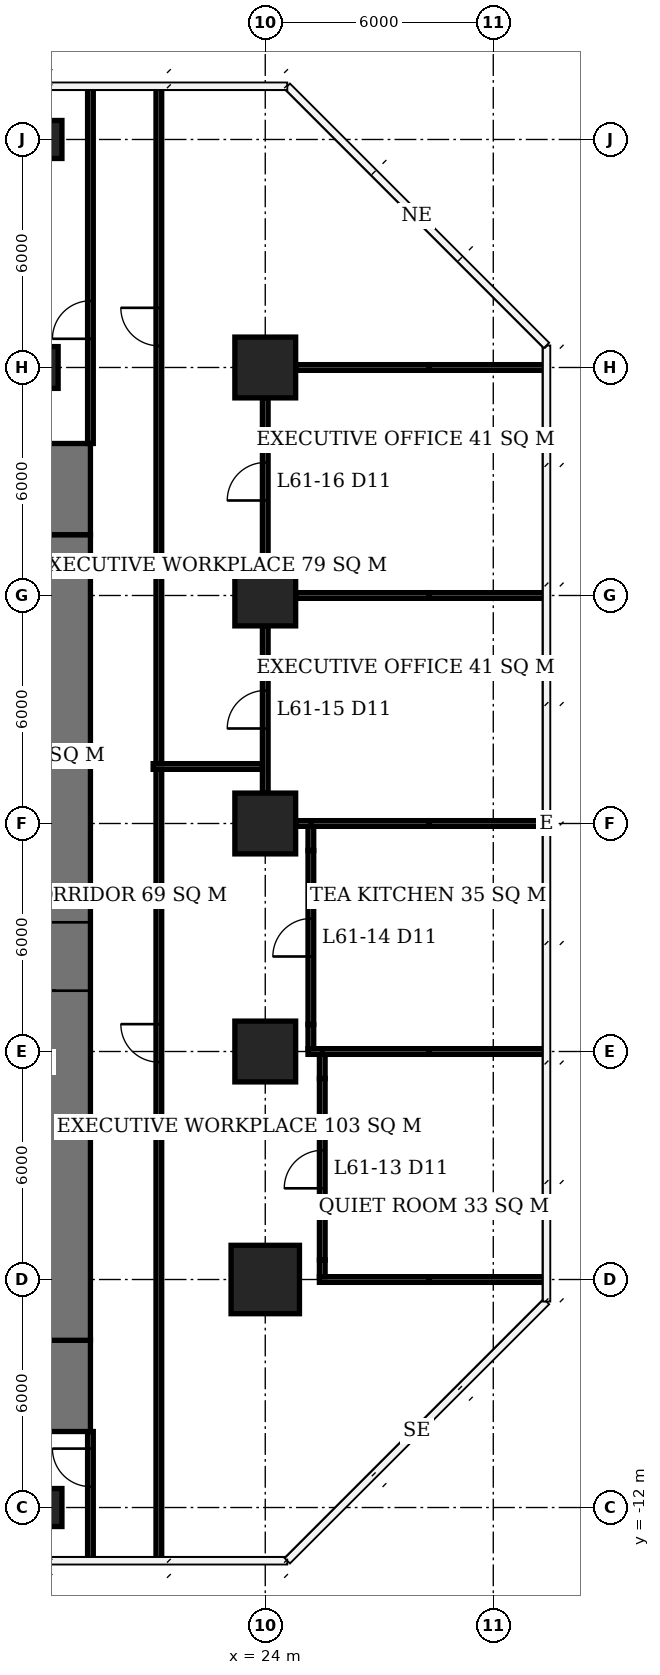
"""IFC4 building model, lengths in metres.
Left out: names, types, materials, properties, quantities, classifications, styles, units other than length and angle.
Written with IfcOpenShell. Run it as: python <this file> out.ifc"""

import sys

from ifc_helpers import new_model, si_unit, direction, frame, frame_2d, origin, origin_2d, place, context, subcontext, project, spatial, rectangle, extrude, element, fill, save


model = new_model("IFC4")
c1 = context("Model", 3, precision=1e-05, world=origin(), true_north=direction((0.0, 1.0)))
c2 = subcontext(c1, "Body", "Model", "MODEL_VIEW")
j1 = project(units=[si_unit("LENGTHUNIT", "METRE"), si_unit("PLANEANGLEUNIT", "RADIAN")], contexts=[c1])
p1 = place(None, origin())
s1 = spatial("IfcSite", under=j1, at=p1, CompositionType="ELEMENT")
p2 = place(p1, origin())
s2 = spatial("IfcBuilding", under=s1, at=p2, CompositionType="ELEMENT")
p3 = place(p2, frame((0.0, 0.0, 248.9)))
s3 = spatial("IfcBuildingStorey", under=s2, at=p3, CompositionType="ELEMENT", Elevation=248.9)
p4 = place(p3, frame((18.0, -12.0, 0.0), z_axis=(0.0, 0.0, 1.0), x_axis=(1.0, 0.0, 0.0)))
e1 = element("IfcColumn", 1, at=p4, inside=s3, PredefinedType="COLUMN", context=c2, shape_type="SweptSolid", body=[
    extrude(rectangle(XDim=1.3, YDim=1.0, at=origin_2d()), origin(), (0.0, 0.0, 1.0), 3.9),
])
p5 = place(p3, frame((18.0, 18.0, 0.0), z_axis=(0.0, 0.0, 1.0), x_axis=(1.0, 0.0, 0.0)))
e2 = element("IfcColumn", 2, at=p5, inside=s3, PredefinedType="COLUMN", context=c2, shape_type="SweptSolid", body=[
    extrude(rectangle(XDim=1.1, YDim=1.1, at=origin_2d()), origin(), (0.0, 0.0, 1.0), 3.9),
])
p6 = place(p3, frame((18.0, 24.0, 0.0), z_axis=(0.0, 0.0, 1.0), x_axis=(1.0, 0.0, 0.0)))
e3 = element("IfcColumn", 3, at=p6, inside=s3, PredefinedType="COLUMN", context=c2, shape_type="SweptSolid", body=[
    extrude(rectangle(XDim=1.3, YDim=1.0, at=origin_2d()), origin(), (0.0, 0.0, 1.0), 3.9),
])
p7 = place(p3, frame((24.0, -6.0, 0.0), z_axis=(0.0, 0.0, 1.0), x_axis=(1.0, 0.0, 0.0)))
e4 = element("IfcColumn", 4, at=p7, inside=s3, PredefinedType="COLUMN", context=c2, shape_type="SweptSolid", body=[
    extrude(rectangle(XDim=1.8, YDim=1.8, at=origin_2d()), origin(), (0.0, 0.0, 1.0), 3.9),
])
for number, where, z_axis, x_axis in (
    (5, (24.0, 0.0, 0.0), (0.0, 0.0, 1.0), (1.0, 0.0, 0.0)),
    (6, (24.0, 6.0, 0.0), (0.0, 0.0, 1.0), (1.0, 0.0, 0.0)),
    (7, (24.0, 12.0, 0.0), (0.0, 0.0, 1.0), (1.0, 0.0, 0.0)),
    (8, (24.0, 18.0, 0.0), (0.0, 0.0, 1.0), (1.0, 0.0, 0.0)),
):
    element("IfcColumn", number, at=place(p3, frame(where, z_axis=z_axis, x_axis=x_axis)), inside=s3, PredefinedType="COLUMN", context=c2, shape_type="SweptSolid", body=[
        extrude(rectangle(XDim=1.6, YDim=1.6, at=origin_2d()), origin(), (0.0, 0.0, 1.0), 3.9),
    ])
p8 = place(p3, frame((18.5, -7.6, 0.0), z_axis=(0.0, 0.0, 1.0), x_axis=(0.0, 1.0, 0.0)))
e9 = element("IfcWall", 9, at=p8, inside=s3, PredefinedType="SHEAR", context=c2, shape_type="SweptSolid", body=[
    extrude(rectangle(XDim=21.2, YDim=1.8, at=frame_2d((10.6, 0.0))), origin(), (0.0, 0.0, 1.0), 3.9),
])
p9 = place(p8, frame((9.2, 0.0, 0.0)))
e10 = element("IfcOpeningElement", 10, at=p9, cuts=e9, PredefinedType="OPENING", context=c2, shape_type="SweptSolid", body=[
    extrude(rectangle(XDim=1.8, YDim=2.4, at=frame_2d((0.9, 1.2))), frame((0.0, 0.91, 0.0), z_axis=(0.0, -1.0, 0.0), x_axis=(1.0, 0.0, 0.0)), (0.0, 0.0, 1.0), 1.82),
])
for number, where, z_axis, x_axis in (
    (11, (18.5, -10.0, 0.0), (0.0, 0.0, 1.0), (0.0, 1.0, 0.0)),
    (12, (18.5, 13.6, 0.0), (0.0, 0.0, 1.0), (0.0, 1.0, 0.0)),
):
    element("IfcWall", number, at=place(p3, frame(where, z_axis=z_axis, x_axis=x_axis)), inside=s3, PredefinedType="SHEAR", context=c2, shape_type="SweptSolid", body=[
        extrude(rectangle(XDim=2.4, YDim=1.8, at=frame_2d((1.2, 0.0))), origin(), (0.0, 0.0, 1.0), 3.9),
    ])
p10 = place(p3, frame((25.425, -6.0, 0.0), z_axis=(0.0, 0.0, 1.0), x_axis=(1.0, 0.0, 0.0)))
e13 = element("IfcWall", 13, at=p10, inside=s3, PredefinedType="PARTITIONING", context=c2, shape_type="SweptSolid", body=[
    extrude(rectangle(XDim=2.885, YDim=0.15, at=frame_2d((1.442, 0.0))), origin(), (0.0, 0.0, 1.0), 2.65),
])
p11 = place(p3, frame((28.31, -6.0, 0.0), z_axis=(0.0, 0.0, 1.0), x_axis=(1.0, 0.0, 0.0)))
e14 = element("IfcWall", 14, at=p11, inside=s3, PredefinedType="PARTITIONING", context=c2, shape_type="SweptSolid", body=[
    extrude(rectangle(XDim=3.065, YDim=0.15, at=frame_2d((1.532, 0.0))), origin(), (0.0, 0.0, 1.0), 3.65),
])
p12 = place(p3, frame((25.125, 0.0, 0.0), z_axis=(0.0, 0.0, 1.0), x_axis=(1.0, 0.0, 0.0)))
e15 = element("IfcWall", 15, at=p12, inside=s3, PredefinedType="PARTITIONING", context=c2, shape_type="SweptSolid", body=[
    extrude(rectangle(XDim=0.45, YDim=0.15, at=frame_2d((0.225, 0.0))), origin(), (0.0, 0.0, 1.0), 2.65),
])
p13 = place(p3, frame((25.5, 0.0, 0.0), z_axis=(0.0, 0.0, 1.0), x_axis=(1.0, 0.0, 0.0)))
e16 = element("IfcWall", 16, at=p13, inside=s3, PredefinedType="PARTITIONING", context=c2, shape_type="SweptSolid", body=[
    extrude(rectangle(XDim=2.81, YDim=0.15, at=frame_2d((1.405, 0.0))), origin(), (0.0, 0.0, 1.0), 2.65),
])
p14 = place(p3, frame((28.31, 0.0, 0.0), z_axis=(0.0, 0.0, 1.0), x_axis=(1.0, 0.0, 0.0)))
e17 = element("IfcWall", 17, at=p14, inside=s3, PredefinedType="PARTITIONING", context=c2, shape_type="SweptSolid", body=[
    extrude(rectangle(XDim=3.065, YDim=0.15, at=frame_2d((1.532, 0.0))), origin(), (0.0, 0.0, 1.0), 3.65),
])
p15 = place(p3, frame((24.8, 6.0, 0.0), z_axis=(0.0, 0.0, 1.0), x_axis=(1.0, 0.0, 0.0)))
e18 = element("IfcWall", 18, at=p15, inside=s3, PredefinedType="PARTITIONING", context=c2, shape_type="SweptSolid", body=[
    extrude(rectangle(XDim=0.475, YDim=0.15, at=frame_2d((0.237, 0.0))), origin(), (0.0, 0.0, 1.0), 2.65),
])
p16 = place(p3, frame((25.2, 6.0, 0.0), z_axis=(0.0, 0.0, 1.0), x_axis=(1.0, 0.0, 0.0)))
e19 = element("IfcWall", 19, at=p16, inside=s3, PredefinedType="PARTITIONING", context=c2, shape_type="SweptSolid", body=[
    extrude(rectangle(XDim=3.11, YDim=0.15, at=frame_2d((1.555, 0.0))), origin(), (0.0, 0.0, 1.0), 2.65),
])
p17 = place(p3, frame((28.31, 6.0, 0.0), z_axis=(0.0, 0.0, 1.0), x_axis=(1.0, 0.0, 0.0)))
e20 = element("IfcWall", 20, at=p17, inside=s3, PredefinedType="PARTITIONING", context=c2, shape_type="SweptSolid", body=[
    extrude(rectangle(XDim=3.04, YDim=0.15, at=frame_2d((1.52, 0.0))), origin(), (0.0, 0.0, 1.0), 3.65),
])
p18 = place(p3, frame((24.8, 12.0, 0.0), z_axis=(0.0, 0.0, 1.0), x_axis=(1.0, 0.0, 0.0)))
e21 = element("IfcWall", 21, at=p18, inside=s3, PredefinedType="PARTITIONING", context=c2, shape_type="SweptSolid", body=[
    extrude(rectangle(XDim=3.51, YDim=0.15, at=frame_2d((1.755, 0.0))), origin(), (0.0, 0.0, 1.0), 2.65),
])
p19 = place(p3, frame((28.31, 12.0, 0.0), z_axis=(0.0, 0.0, 1.0), x_axis=(1.0, 0.0, 0.0)))
e22 = element("IfcWall", 22, at=p19, inside=s3, PredefinedType="PARTITIONING", context=c2, shape_type="SweptSolid", body=[
    extrude(rectangle(XDim=3.065, YDim=0.15, at=frame_2d((1.532, 0.0))), origin(), (0.0, 0.0, 1.0), 3.65),
])
p20 = place(p3, frame((24.8, 18.0, 0.0), z_axis=(0.0, 0.0, 1.0), x_axis=(1.0, 0.0, 0.0)))
e23 = element("IfcWall", 23, at=p20, inside=s3, PredefinedType="PARTITIONING", context=c2, shape_type="SweptSolid", body=[
    extrude(rectangle(XDim=3.51, YDim=0.15, at=frame_2d((1.755, 0.0))), origin(), (0.0, 0.0, 1.0), 2.65),
])
p21 = place(p3, frame((28.31, 18.0, 0.0), z_axis=(0.0, 0.0, 1.0), x_axis=(1.0, 0.0, 0.0)))
e24 = element("IfcWall", 24, at=p21, inside=s3, PredefinedType="PARTITIONING", context=c2, shape_type="SweptSolid", body=[
    extrude(rectangle(XDim=3.065, YDim=0.15, at=frame_2d((1.532, 0.0))), origin(), (0.0, 0.0, 1.0), 3.65),
])
p22 = place(p3, frame((24.0, 6.8, 0.0), z_axis=(0.0, 0.0, 1.0), x_axis=(0.0, 1.0, 0.0)))
e25 = element("IfcWall", 25, at=p22, inside=s3, PredefinedType="PARTITIONING", context=c2, shape_type="SweptSolid", body=[
    extrude(rectangle(XDim=4.4, YDim=0.15, at=frame_2d((2.2, 0.0))), origin(), (0.0, 0.0, 1.0), 3.65),
])
p23 = place(p22, frame((1.7, 0.0, 0.0)))
e26 = element("IfcOpeningElement", 26, at=p23, cuts=e25, PredefinedType="OPENING", context=c2, shape_type="SweptSolid", body=[
    extrude(rectangle(XDim=1.0, YDim=2.4, at=frame_2d((0.5, 1.2))), frame((0.0, 0.085, 0.0), z_axis=(0.0, -1.0, 0.0), x_axis=(1.0, 0.0, 0.0)), (0.0, 0.0, 1.0), 0.17),
])
p24 = place(p3, frame((24.0, 12.8, 0.0), z_axis=(0.0, 0.0, 1.0), x_axis=(0.0, 1.0, 0.0)))
e27 = element("IfcWall", 27, at=p24, inside=s3, PredefinedType="PARTITIONING", context=c2, shape_type="SweptSolid", body=[
    extrude(rectangle(XDim=4.4, YDim=0.15, at=frame_2d((2.2, 0.0))), origin(), (0.0, 0.0, 1.0), 3.65),
])
p25 = place(p24, frame((1.7, 0.0, 0.0)))
e28 = element("IfcOpeningElement", 28, at=p25, cuts=e27, PredefinedType="OPENING", context=c2, shape_type="SweptSolid", body=[
    extrude(rectangle(XDim=1.0, YDim=2.4, at=frame_2d((0.5, 1.2))), frame((0.0, 0.085, 0.0), z_axis=(0.0, -1.0, 0.0), x_axis=(1.0, 0.0, 0.0)), (0.0, 0.0, 1.0), 0.17),
])
p26 = place(p3, frame((25.2, 0.075, 0.0), z_axis=(0.0, 0.0, 1.0), x_axis=(0.0, 1.0, 0.0)))
e29 = element("IfcWall", 29, at=p26, inside=s3, PredefinedType="PARTITIONING", context=c2, shape_type="SweptSolid", body=[
    extrude(rectangle(XDim=0.635, YDim=0.15, at=frame_2d((0.317, 0.0))), origin(), (0.0, 0.0, 1.0), 2.65),
])
p27 = place(p3, frame((25.2, 0.71, 0.0), z_axis=(0.0, 0.0, 1.0), x_axis=(0.0, 1.0, 0.0)))
e30 = element("IfcWall", 30, at=p27, inside=s3, PredefinedType="PARTITIONING", context=c2, shape_type="SweptSolid", body=[
    extrude(rectangle(XDim=4.58, YDim=0.15, at=frame_2d((2.29, 0.0))), origin(), (0.0, 0.0, 1.0), 3.65),
])
p28 = place(p27, frame((1.79, 0.0, 0.0)))
e31 = element("IfcOpeningElement", 31, at=p28, cuts=e30, PredefinedType="OPENING", context=c2, shape_type="SweptSolid", body=[
    extrude(rectangle(XDim=1.0, YDim=2.4, at=frame_2d((0.5, 1.2))), frame((0.0, 0.085, 0.0), z_axis=(0.0, -1.0, 0.0), x_axis=(1.0, 0.0, 0.0)), (0.0, 0.0, 1.0), 0.17),
])
p29 = place(p3, frame((25.2, 5.29, 0.0), z_axis=(0.0, 0.0, 1.0), x_axis=(0.0, 1.0, 0.0)))
e32 = element("IfcWall", 32, at=p29, inside=s3, PredefinedType="PARTITIONING", context=c2, shape_type="SweptSolid", body=[
    extrude(rectangle(XDim=0.635, YDim=0.15, at=frame_2d((0.317, 0.0))), origin(), (0.0, 0.0, 1.0), 2.65),
])
p30 = place(p3, frame((25.5, -5.925, 0.0), z_axis=(0.0, 0.0, 1.0), x_axis=(0.0, 1.0, 0.0)))
e33 = element("IfcWall", 33, at=p30, inside=s3, PredefinedType="PARTITIONING", context=c2, shape_type="SweptSolid", body=[
    extrude(rectangle(XDim=0.435, YDim=0.15, at=frame_2d((0.218, 0.0))), origin(), (0.0, 0.0, 1.0), 2.65),
])
p31 = place(p3, frame((25.5, -5.49, 0.0), z_axis=(0.0, 0.0, 1.0), x_axis=(0.0, 1.0, 0.0)))
e34 = element("IfcWall", 34, at=p31, inside=s3, PredefinedType="PARTITIONING", context=c2, shape_type="SweptSolid", body=[
    extrude(rectangle(XDim=4.78, YDim=0.15, at=frame_2d((2.39, 0.0))), origin(), (0.0, 0.0, 1.0), 3.65),
])
p32 = place(p31, frame((1.89, 0.0, 0.0)))
e35 = element("IfcOpeningElement", 35, at=p32, cuts=e34, PredefinedType="OPENING", context=c2, shape_type="SweptSolid", body=[
    extrude(rectangle(XDim=1.0, YDim=2.4, at=frame_2d((0.5, 1.2))), frame((0.0, 0.085, 0.0), z_axis=(0.0, -1.0, 0.0), x_axis=(1.0, 0.0, 0.0)), (0.0, 0.0, 1.0), 0.17),
])
p33 = place(p3, frame((25.5, -0.71, 0.0), z_axis=(0.0, 0.0, 1.0), x_axis=(0.0, 1.0, 0.0)))
e36 = element("IfcWall", 36, at=p33, inside=s3, PredefinedType="PARTITIONING", context=c2, shape_type="SweptSolid", body=[
    extrude(rectangle(XDim=0.635, YDim=0.15, at=frame_2d((0.317, 0.0))), origin(), (0.0, 0.0, 1.0), 2.65),
])
p34 = place(p3, frame((19.4, -13.375, 0.0), z_axis=(0.0, 0.0, 1.0), x_axis=(0.0, 1.0, 0.0)))
e37 = element("IfcWall", 37, at=p34, inside=s3, PredefinedType="PARTITIONING", context=c2, shape_type="SweptSolid", body=[
    extrude(rectangle(XDim=3.375, YDim=0.15, at=frame_2d((1.688, 0.0))), origin(), (0.0, 0.0, 1.0), 3.65),
])
p35 = place(p34, frame((1.925, 0.0, 0.0)))
e38 = element("IfcOpeningElement", 38, at=p35, cuts=e37, PredefinedType="OPENING", context=c2, shape_type="SweptSolid", body=[
    extrude(rectangle(XDim=1.0, YDim=2.1, at=frame_2d((0.5, 1.05))), frame((0.0, 0.085, 0.0), z_axis=(0.0, -1.0, 0.0), x_axis=(1.0, 0.0, 0.0)), (0.0, 0.0, 1.0), 0.17),
])
p36 = place(p3, frame((19.4, 16.0, 0.0), z_axis=(0.0, 0.0, 1.0), x_axis=(0.0, 1.0, 0.0)))
e39 = element("IfcWall", 39, at=p36, inside=s3, PredefinedType="PARTITIONING", context=c2, shape_type="SweptSolid", body=[
    extrude(rectangle(XDim=9.375, YDim=0.15, at=frame_2d((4.688, 0.0))), origin(), (0.0, 0.0, 1.0), 3.65),
])
p37 = place(p36, frame((2.755, 0.0, 0.0)))
e40 = element("IfcOpeningElement", 40, at=p37, cuts=e39, PredefinedType="OPENING", context=c2, shape_type="SweptSolid", body=[
    extrude(rectangle(XDim=1.0, YDim=2.4, at=frame_2d((0.5, 1.2))), frame((0.0, 0.085, 0.0), z_axis=(0.0, -1.0, 0.0), x_axis=(1.0, 0.0, 0.0)), (0.0, 0.0, 1.0), 0.17),
])
p38 = place(p3, frame((21.2, -13.375, 0.0), z_axis=(0.0, 0.0, 1.0), x_axis=(0.0, 1.0, 0.0)))
e41 = element("IfcWall", 41, at=p38, inside=s3, PredefinedType="PARTITIONING", context=c2, shape_type="SweptSolid", body=[
    extrude(rectangle(XDim=20.8, YDim=0.15, at=frame_2d((10.4, 0.0))), origin(), (0.0, 0.0, 1.0), 3.65),
])
p39 = place(p38, frame((13.095, 0.0, 0.0)))
e42 = element("IfcOpeningElement", 42, at=p39, cuts=e41, PredefinedType="OPENING", context=c2, shape_type="SweptSolid", body=[
    extrude(rectangle(XDim=1.0, YDim=2.4, at=frame_2d((0.5, 1.2))), frame((0.0, 0.085, 0.0), z_axis=(0.0, -1.0, 0.0), x_axis=(1.0, 0.0, 0.0)), (0.0, 0.0, 1.0), 0.17),
])
p40 = place(p3, frame((21.2, 7.575, 0.0), z_axis=(0.0, 0.0, 1.0), x_axis=(0.0, 1.0, 0.0)))
e43 = element("IfcWall", 43, at=p40, inside=s3, PredefinedType="PARTITIONING", context=c2, shape_type="SweptSolid", body=[
    extrude(rectangle(XDim=17.8, YDim=0.15, at=frame_2d((8.9, 0.0))), origin(), (0.0, 0.0, 1.0), 3.65),
])
p41 = place(p40, frame((10.995, 0.0, 0.0)))
e44 = element("IfcOpeningElement", 44, at=p41, cuts=e43, PredefinedType="OPENING", context=c2, shape_type="SweptSolid", body=[
    extrude(rectangle(XDim=1.0, YDim=2.4, at=frame_2d((0.5, 1.2))), frame((0.0, 0.085, 0.0), z_axis=(0.0, -1.0, 0.0), x_axis=(1.0, 0.0, 0.0)), (0.0, 0.0, 1.0), 0.17),
])
p42 = place(p3, frame((21.05, 7.5, 0.0), z_axis=(0.0, 0.0, 1.0), x_axis=(1.0, 0.0, 0.0)))
e45 = element("IfcWall", 45, at=p42, inside=s3, PredefinedType="PARTITIONING", context=c2, shape_type="SweptSolid", body=[
    extrude(rectangle(XDim=2.875, YDim=0.15, at=frame_2d((1.438, 0.0))), origin(), (0.0, 0.0, 1.0), 3.65),
])
p43 = place(p9, origin())
e46 = element("IfcDoor", 46, at=p43, inside=s3, OperationType="DOUBLE_DOOR_SINGLE_SWING", PredefinedType="DOOR", context=c2, shape_type="SweptSolid", body=[
    extrude(rectangle(XDim=1.8, YDim=2.4, at=frame_2d((0.9, 1.2))), frame((0.0, 0.025, 0.0), z_axis=(0.0, -1.0, 0.0), x_axis=(1.0, 0.0, 0.0)), (0.0, 0.0, 1.0), 0.05),
])
fill(e10, e46)
p44 = place(p32, origin())
e47 = element("IfcDoor", 47, at=p44, inside=s3, OperationType="SINGLE_SWING_LEFT", PredefinedType="DOOR", context=c2, shape_type="SweptSolid", body=[
    extrude(rectangle(XDim=1.0, YDim=2.4, at=frame_2d((0.5, 1.2))), frame((0.0, 0.025, 0.0), z_axis=(0.0, -1.0, 0.0), x_axis=(1.0, 0.0, 0.0)), (0.0, 0.0, 1.0), 0.05),
])
fill(e35, e47)
p45 = place(p28, origin())
e48 = element("IfcDoor", 48, at=p45, inside=s3, OperationType="SINGLE_SWING_LEFT", PredefinedType="DOOR", context=c2, shape_type="SweptSolid", body=[
    extrude(rectangle(XDim=1.0, YDim=2.4, at=frame_2d((0.5, 1.2))), frame((0.0, 0.025, 0.0), z_axis=(0.0, -1.0, 0.0), x_axis=(1.0, 0.0, 0.0)), (0.0, 0.0, 1.0), 0.05),
])
fill(e31, e48)
p46 = place(p23, origin())
e49 = element("IfcDoor", 49, at=p46, inside=s3, OperationType="SINGLE_SWING_LEFT", PredefinedType="DOOR", context=c2, shape_type="SweptSolid", body=[
    extrude(rectangle(XDim=1.0, YDim=2.4, at=frame_2d((0.5, 1.2))), frame((0.0, 0.025, 0.0), z_axis=(0.0, -1.0, 0.0), x_axis=(1.0, 0.0, 0.0)), (0.0, 0.0, 1.0), 0.05),
])
fill(e26, e49)
p47 = place(p25, origin())
e50 = element("IfcDoor", 50, at=p47, inside=s3, OperationType="SINGLE_SWING_LEFT", PredefinedType="DOOR", context=c2, shape_type="SweptSolid", body=[
    extrude(rectangle(XDim=1.0, YDim=2.4, at=frame_2d((0.5, 1.2))), frame((0.0, 0.025, 0.0), z_axis=(0.0, -1.0, 0.0), x_axis=(1.0, 0.0, 0.0)), (0.0, 0.0, 1.0), 0.05),
])
fill(e28, e50)
p48 = place(p39, origin())
e51 = element("IfcDoor", 51, at=p48, inside=s3, OperationType="SINGLE_SWING_RIGHT", PredefinedType="DOOR", context=c2, shape_type="SweptSolid", body=[
    extrude(rectangle(XDim=1.0, YDim=2.4, at=frame_2d((0.5, 1.2))), frame((0.0, 0.025, 0.0), z_axis=(0.0, -1.0, 0.0), x_axis=(1.0, 0.0, 0.0)), (0.0, 0.0, 1.0), 0.05),
])
fill(e42, e51)
p49 = place(p41, origin())
e52 = element("IfcDoor", 52, at=p49, inside=s3, OperationType="SINGLE_SWING_RIGHT", PredefinedType="DOOR", context=c2, shape_type="SweptSolid", body=[
    extrude(rectangle(XDim=1.0, YDim=2.4, at=frame_2d((0.5, 1.2))), frame((0.0, 0.025, 0.0), z_axis=(0.0, -1.0, 0.0), x_axis=(1.0, 0.0, 0.0)), (0.0, 0.0, 1.0), 0.05),
])
fill(e44, e52)
p50 = place(p37, origin())
e53 = element("IfcDoor", 53, at=p50, inside=s3, OperationType="SINGLE_SWING_LEFT", PredefinedType="DOOR", context=c2, shape_type="SweptSolid", body=[
    extrude(rectangle(XDim=1.0, YDim=2.4, at=frame_2d((0.5, 1.2))), frame((0.0, 0.025, 0.0), z_axis=(0.0, -1.0, 0.0), x_axis=(1.0, 0.0, 0.0)), (0.0, 0.0, 1.0), 0.05),
])
fill(e40, e53)
p51 = place(p35, origin())
e54 = element("IfcDoor", 54, at=p51, inside=s3, OperationType="SINGLE_SWING_RIGHT", PredefinedType="DOOR", context=c2, shape_type="SweptSolid", body=[
    extrude(rectangle(XDim=1.0, YDim=2.1, at=frame_2d((0.5, 1.05))), frame((0.0, 0.025, 0.0), z_axis=(0.0, -1.0, 0.0), x_axis=(1.0, 0.0, 0.0)), (0.0, 0.0, 1.0), 0.05),
])
fill(e38, e54)
save(model, sys.argv[1])
